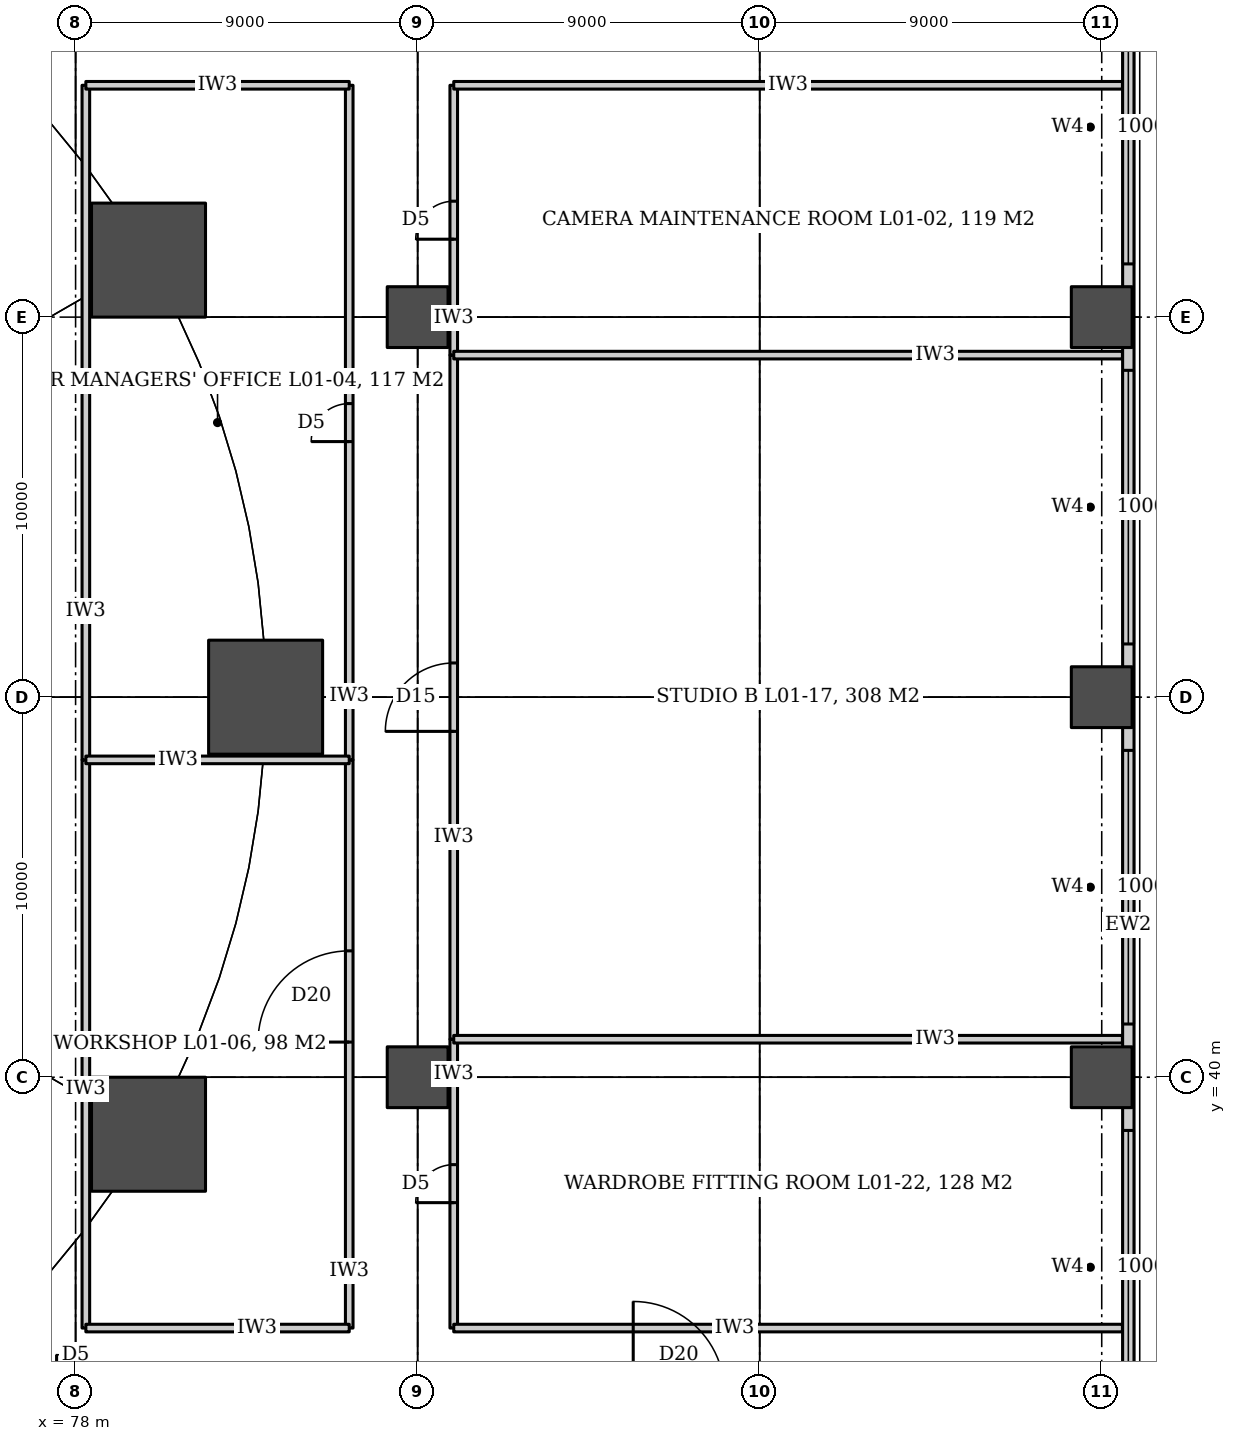
"""IFC4 building model, lengths in metres.
Left out: names, types, materials, properties, quantities, classifications, styles, units other than length and angle.
Written with IfcOpenShell. Run it as: python <this file> out.ifc"""

import sys

from ifc_helpers import new_model, si_unit, direction, frame, frame_2d, origin, origin_2d, place, context, subcontext, project, spatial, rectangle, circle, extrude, element, fill, save


model = new_model("IFC4")
c1 = context("Model", 3, precision=1e-05, world=origin(), true_north=direction((0.0, 1.0)))
c2 = subcontext(c1, "Body", "Model", "MODEL_VIEW")
j1 = project(units=[si_unit("LENGTHUNIT", "METRE"), si_unit("PLANEANGLEUNIT", "RADIAN")], contexts=[c1])
p1 = place(None, origin())
s1 = spatial("IfcSite", under=j1, at=p1, CompositionType="ELEMENT")
p2 = place(p1, origin())
s2 = spatial("IfcBuilding", under=s1, at=p2, CompositionType="ELEMENT")
p3 = place(p2, frame((0.0, 0.0, 6.0)))
s3 = spatial("IfcBuildingStorey", under=s2, at=p3, CompositionType="ELEMENT", Elevation=6.0)
for number, where, z_axis, x_axis in (
    (1, (87.0, 40.0, 0.0), (0.0, 0.0, 1.0), (1.0, 0.0, 0.0)),
    (2, (105.0, 40.0, 0.0), (0.0, 0.0, 1.0), (1.0, 0.0, 0.0)),
    (3, (105.0, 50.0, 0.0), (0.0, 0.0, 1.0), (1.0, 0.0, 0.0)),
    (4, (87.0, 60.0, 0.0), (0.0, 0.0, 1.0), (1.0, 0.0, 0.0)),
    (5, (105.0, 60.0, 0.0), (0.0, 0.0, 1.0), (1.0, 0.0, 0.0)),
):
    element("IfcColumn", number, at=place(p3, frame(where, z_axis=z_axis, x_axis=x_axis)), inside=s3, PredefinedType="COLUMN", context=c2, shape_type="SweptSolid", body=[
        extrude(rectangle(XDim=1.6, YDim=1.6, at=origin_2d()), origin(), (0.0, 0.0, 1.0), 9.0),
    ])
for number, where, z_axis, x_axis in (
    (6, (83.0, 50.0, 0.0), (0.0, 0.0, 1.0), (1.0, 0.0, 0.0)),
    (7, (79.919, 61.5, 0.0), (0.0, 0.0, 1.0), (1.0, 0.0, 0.0)),
    (8, (79.919, 38.5, 0.0), (0.0, 0.0, 1.0), (1.0, 0.0, 0.0)),
):
    element("IfcColumn", number, at=place(p3, frame(where, z_axis=z_axis, x_axis=x_axis)), inside=s3, PredefinedType="COLUMN", context=c2, shape_type="SweptSolid", body=[
        extrude(circle(Radius=1.5, at=origin_2d()), origin(), (0.0, 0.0, 1.0), 9.0),
    ])
p4 = place(p3, frame((78.27, 33.4, 0.0), z_axis=(0.0, 0.0, 1.0), x_axis=(0.0, 1.0, 0.0)))
e9 = element("IfcWall", 9, at=p4, inside=s3, PredefinedType="PARTITIONING", context=c2, shape_type="SweptSolid", body=[
    extrude(rectangle(XDim=14.95, YDim=0.2, at=frame_2d((7.475, 0.0))), origin(), (0.0, 0.0, 1.0), 6.08),
])
p5 = place(p3, frame((78.27, 48.35, 0.0), z_axis=(0.0, 0.0, 1.0), x_axis=(0.0, 1.0, 0.0)))
e10 = element("IfcWall", 10, at=p5, inside=s3, PredefinedType="PARTITIONING", context=c2, shape_type="SweptSolid", body=[
    extrude(rectangle(XDim=17.75, YDim=0.2, at=frame_2d((8.875, 0.0))), origin(), (0.0, 0.0, 1.0), 6.08),
])
p6 = place(p3, frame((85.2, 33.4, 0.0), z_axis=(0.0, 0.0, 1.0), x_axis=(0.0, 1.0, 0.0)))
e11 = element("IfcWall", 11, at=p6, inside=s3, PredefinedType="PARTITIONING", context=c2, shape_type="SweptSolid", body=[
    extrude(rectangle(XDim=14.95, YDim=0.2, at=frame_2d((7.475, 0.0))), origin(), (0.0, 0.0, 1.0), 6.68),
])
p7 = place(p6, frame((7.525, 0.0, 0.0)))
e12 = element("IfcOpeningElement", 12, at=p7, cuts=e11, PredefinedType="OPENING", context=c2, shape_type="SweptSolid", body=[
    extrude(rectangle(XDim=2.4, YDim=2.7, at=frame_2d((1.2, 1.35))), frame((0.0, 0.11, 0.0), z_axis=(0.0, -1.0, 0.0), x_axis=(1.0, 0.0, 0.0)), (0.0, 0.0, 1.0), 0.22),
])
p8 = place(p3, frame((85.2, 48.35, 0.0), z_axis=(0.0, 0.0, 1.0), x_axis=(0.0, 1.0, 0.0)))
e13 = element("IfcWall", 13, at=p8, inside=s3, PredefinedType="PARTITIONING", context=c2, shape_type="SweptSolid", body=[
    extrude(rectangle(XDim=17.75, YDim=0.2, at=frame_2d((8.875, 0.0))), origin(), (0.0, 0.0, 1.0), 6.18),
])
p9 = place(p8, frame((8.375, 0.0, 0.0)))
e14 = element("IfcOpeningElement", 14, at=p9, cuts=e13, PredefinedType="OPENING", context=c2, shape_type="SweptSolid", body=[
    extrude(rectangle(XDim=1.0, YDim=2.1, at=frame_2d((0.5, 1.05))), frame((0.0, 0.11, 0.0), z_axis=(0.0, -1.0, 0.0), x_axis=(1.0, 0.0, 0.0)), (0.0, 0.0, 1.0), 0.22),
])
p10 = place(p3, frame((87.95, 33.4, 0.0), z_axis=(0.0, 0.0, 1.0), x_axis=(0.0, 1.0, 0.0)))
e15 = element("IfcWall", 15, at=p10, inside=s3, PredefinedType="PARTITIONING", context=c2, shape_type="SweptSolid", body=[
    extrude(rectangle(XDim=7.6, YDim=0.2, at=frame_2d((3.8, 0.0))), origin(), (0.0, 0.0, 1.0), 6.18),
])
p11 = place(p10, frame((3.3, 0.0, 0.0)))
e16 = element("IfcOpeningElement", 16, at=p11, cuts=e15, PredefinedType="OPENING", context=c2, shape_type="SweptSolid", body=[
    extrude(rectangle(XDim=1.0, YDim=2.1, at=frame_2d((0.5, 1.05))), frame((0.0, 0.11, 0.0), z_axis=(0.0, -1.0, 0.0), x_axis=(1.0, 0.0, 0.0)), (0.0, 0.0, 1.0), 0.22),
])
p12 = place(p3, frame((87.95, 41.0, 0.0), z_axis=(0.0, 0.0, 1.0), x_axis=(0.0, 1.0, 0.0)))
e17 = element("IfcWall", 17, at=p12, inside=s3, PredefinedType="PARTITIONING", context=c2, shape_type="SweptSolid", body=[
    extrude(rectangle(XDim=18.0, YDim=0.2, at=frame_2d((9.0, 0.0))), origin(), (0.0, 0.0, 1.0), 6.18),
])
p13 = place(p12, frame((8.1, 0.0, 0.0)))
e18 = element("IfcOpeningElement", 18, at=p13, cuts=e17, PredefinedType="OPENING", context=c2, shape_type="SweptSolid", body=[
    extrude(rectangle(XDim=1.8, YDim=2.7, at=frame_2d((0.9, 1.35))), frame((0.0, 0.11, 0.0), z_axis=(0.0, -1.0, 0.0), x_axis=(1.0, 0.0, 0.0)), (0.0, 0.0, 1.0), 0.22),
])
p14 = place(p3, frame((87.95, 59.0, 0.0), z_axis=(0.0, 0.0, 1.0), x_axis=(0.0, 1.0, 0.0)))
e19 = element("IfcWall", 19, at=p14, inside=s3, PredefinedType="PARTITIONING", context=c2, shape_type="SweptSolid", body=[
    extrude(rectangle(XDim=7.1, YDim=0.2, at=frame_2d((3.55, 0.0))), origin(), (0.0, 0.0, 1.0), 6.18),
])
p15 = place(p14, frame((3.05, 0.0, 0.0)))
e20 = element("IfcOpeningElement", 20, at=p15, cuts=e19, PredefinedType="OPENING", context=c2, shape_type="SweptSolid", body=[
    extrude(rectangle(XDim=1.0, YDim=2.1, at=frame_2d((0.5, 1.05))), frame((0.0, 0.11, 0.0), z_axis=(0.0, -1.0, 0.0), x_axis=(1.0, 0.0, 0.0)), (0.0, 0.0, 1.0), 0.22),
])
p16 = place(p3, frame((78.27, 33.4, 0.0), z_axis=(0.0, 0.0, 1.0), x_axis=(1.0, 0.0, 0.0)))
e21 = element("IfcWall", 21, at=p16, inside=s3, PredefinedType="PARTITIONING", context=c2, shape_type="SweptSolid", body=[
    extrude(rectangle(XDim=6.93, YDim=0.2, at=frame_2d((3.465, 0.0))), origin(), (0.0, 0.0, 1.0), 6.68),
])
for number, where, z_axis, x_axis in (
    (22, (87.95, 33.4, 0.0), (0.0, 0.0, 1.0), (1.0, 0.0, 0.0)),
    (23, (87.95, 41.0, 0.0), (0.0, 0.0, 1.0), (1.0, 0.0, 0.0)),
):
    element("IfcWall", number, at=place(p3, frame(where, z_axis=z_axis, x_axis=x_axis)), inside=s3, PredefinedType="PARTITIONING", context=c2, shape_type="SweptSolid", body=[
        extrude(rectangle(XDim=17.595, YDim=0.2, at=frame_2d((8.797, 0.0))), origin(), (0.0, 0.0, 1.0), 6.68),
    ])
p17 = place(p3, frame((78.27, 48.35, 0.0), z_axis=(0.0, 0.0, 1.0), x_axis=(1.0, 0.0, 0.0)))
e24 = element("IfcWall", 24, at=p17, inside=s3, PredefinedType="PARTITIONING", context=c2, shape_type="SweptSolid", body=[
    extrude(rectangle(XDim=6.93, YDim=0.2, at=frame_2d((3.465, 0.0))), origin(), (0.0, 0.0, 1.0), 6.68),
])
p18 = place(p3, frame((87.95, 59.0, 0.0), z_axis=(0.0, 0.0, 1.0), x_axis=(1.0, 0.0, 0.0)))
e25 = element("IfcWall", 25, at=p18, inside=s3, PredefinedType="PARTITIONING", context=c2, shape_type="SweptSolid", body=[
    extrude(rectangle(XDim=17.595, YDim=0.2, at=frame_2d((8.797, 0.0))), origin(), (0.0, 0.0, 1.0), 6.68),
])
p19 = place(p3, frame((78.27, 66.1, 0.0), z_axis=(0.0, 0.0, 1.0), x_axis=(1.0, 0.0, 0.0)))
e26 = element("IfcWall", 26, at=p19, inside=s3, PredefinedType="PARTITIONING", context=c2, shape_type="SweptSolid", body=[
    extrude(rectangle(XDim=6.93, YDim=0.2, at=frame_2d((3.465, 0.0))), origin(), (0.0, 0.0, 1.0), 6.68),
])
p20 = place(p3, frame((87.95, 66.1, 0.0), z_axis=(0.0, 0.0, 1.0), x_axis=(1.0, 0.0, 0.0)))
e27 = element("IfcWall", 27, at=p20, inside=s3, PredefinedType="PARTITIONING", context=c2, shape_type="SweptSolid", body=[
    extrude(rectangle(XDim=17.595, YDim=0.2, at=frame_2d((8.797, 0.0))), origin(), (0.0, 0.0, 1.0), 6.68),
])
p21 = place(p3, frame((105.7, 30.0, 0.0), z_axis=(0.0, 0.0, 1.0), x_axis=(0.0, 1.0, 0.0)))
e28 = element("IfcWall", 28, at=p21, inside=s3, PredefinedType="SOLIDWALL", context=c2, shape_type="SweptSolid", body=[
    extrude(rectangle(XDim=40.0, YDim=0.3, at=frame_2d((20.0, 0.0))), origin(), (0.0, 0.0, 1.0), 8.7),
])
p22 = place(p21, frame((1.4, 0.0, 6.6)))
e29 = element("IfcOpeningElement", 29, at=p22, cuts=e28, PredefinedType="OPENING", context=c2, shape_type="SweptSolid", body=[
    extrude(rectangle(XDim=7.2, YDim=1.2, at=frame_2d((3.6, 0.6))), frame((0.0, 0.16, 0.0), z_axis=(0.0, -1.0, 0.0), x_axis=(1.0, 0.0, 0.0)), (0.0, 0.0, 1.0), 0.32),
])
p23 = place(p21, frame((11.4, 0.0, 6.6)))
e30 = element("IfcOpeningElement", 30, at=p23, cuts=e28, PredefinedType="OPENING", context=c2, shape_type="SweptSolid", body=[
    extrude(rectangle(XDim=7.2, YDim=1.2, at=frame_2d((3.6, 0.6))), frame((0.0, 0.16, 0.0), z_axis=(0.0, -1.0, 0.0), x_axis=(1.0, 0.0, 0.0)), (0.0, 0.0, 1.0), 0.32),
])
p24 = place(p21, frame((21.4, 0.0, 6.6)))
e31 = element("IfcOpeningElement", 31, at=p24, cuts=e28, PredefinedType="OPENING", context=c2, shape_type="SweptSolid", body=[
    extrude(rectangle(XDim=7.2, YDim=1.2, at=frame_2d((3.6, 0.6))), frame((0.0, 0.16, 0.0), z_axis=(0.0, -1.0, 0.0), x_axis=(1.0, 0.0, 0.0)), (0.0, 0.0, 1.0), 0.32),
])
p25 = place(p21, frame((31.4, 0.0, 6.6)))
e32 = element("IfcOpeningElement", 32, at=p25, cuts=e28, PredefinedType="OPENING", context=c2, shape_type="SweptSolid", body=[
    extrude(rectangle(XDim=7.2, YDim=1.2, at=frame_2d((3.6, 0.6))), frame((0.0, 0.16, 0.0), z_axis=(0.0, -1.0, 0.0), x_axis=(1.0, 0.0, 0.0)), (0.0, 0.0, 1.0), 0.32),
])
p26 = place(p13, origin())
e33 = element("IfcDoor", 33, at=p26, inside=s3, OperationType="DOUBLE_DOOR_DOUBLE_SWING", PredefinedType="DOOR", context=c2, shape_type="SweptSolid", body=[
    extrude(rectangle(XDim=1.8, YDim=2.7, at=frame_2d((0.9, 1.35))), frame((0.0, 0.025, 0.0), z_axis=(0.0, -1.0, 0.0), x_axis=(1.0, 0.0, 0.0)), (0.0, 0.0, 1.0), 0.05),
])
fill(e18, e33)
p27 = place(p7, origin())
e34 = element("IfcDoor", 34, at=p27, inside=s3, OperationType="DOUBLE_DOOR_DOUBLE_SWING", PredefinedType="DOOR", context=c2, shape_type="SweptSolid", body=[
    extrude(rectangle(XDim=2.4, YDim=2.7, at=frame_2d((1.2, 1.35))), frame((0.0, 0.025, 0.0), z_axis=(0.0, -1.0, 0.0), x_axis=(1.0, 0.0, 0.0)), (0.0, 0.0, 1.0), 0.05),
])
fill(e12, e34)
p28 = place(p9, origin())
e35 = element("IfcDoor", 35, at=p28, inside=s3, OperationType="SINGLE_SWING_LEFT", PredefinedType="DOOR", context=c2, shape_type="SweptSolid", body=[
    extrude(rectangle(XDim=1.0, YDim=2.1, at=frame_2d((0.5, 1.05))), frame((0.0, 0.025, 0.0), z_axis=(0.0, -1.0, 0.0), x_axis=(1.0, 0.0, 0.0)), (0.0, 0.0, 1.0), 0.05),
])
fill(e14, e35)
p29 = place(p11, origin())
e36 = element("IfcDoor", 36, at=p29, inside=s3, OperationType="SINGLE_SWING_LEFT", PredefinedType="DOOR", context=c2, shape_type="SweptSolid", body=[
    extrude(rectangle(XDim=1.0, YDim=2.1, at=frame_2d((0.5, 1.05))), frame((0.0, 0.025, 0.0), z_axis=(0.0, -1.0, 0.0), x_axis=(1.0, 0.0, 0.0)), (0.0, 0.0, 1.0), 0.05),
])
fill(e16, e36)
p30 = place(p15, origin())
e37 = element("IfcDoor", 37, at=p30, inside=s3, OperationType="SINGLE_SWING_LEFT", PredefinedType="DOOR", context=c2, shape_type="SweptSolid", body=[
    extrude(rectangle(XDim=1.0, YDim=2.1, at=frame_2d((0.5, 1.05))), frame((0.0, 0.025, 0.0), z_axis=(0.0, -1.0, 0.0), x_axis=(1.0, 0.0, 0.0)), (0.0, 0.0, 1.0), 0.05),
])
fill(e20, e37)
p31 = place(p22, origin())
e38 = element("IfcWindow", 38, at=p31, inside=s3, PartitioningType="SINGLE_PANEL", PredefinedType="WINDOW", context=c2, shape_type="SweptSolid", body=[
    extrude(rectangle(XDim=7.2, YDim=1.2, at=frame_2d((3.6, 0.6))), frame((0.0, 0.03, 0.0), z_axis=(0.0, -1.0, 0.0), x_axis=(1.0, 0.0, 0.0)), (0.0, 0.0, 1.0), 0.06),
])
fill(e29, e38)
p32 = place(p23, origin())
e39 = element("IfcWindow", 39, at=p32, inside=s3, PartitioningType="SINGLE_PANEL", PredefinedType="WINDOW", context=c2, shape_type="SweptSolid", body=[
    extrude(rectangle(XDim=7.2, YDim=1.2, at=frame_2d((3.6, 0.6))), frame((0.0, 0.03, 0.0), z_axis=(0.0, -1.0, 0.0), x_axis=(1.0, 0.0, 0.0)), (0.0, 0.0, 1.0), 0.06),
])
fill(e30, e39)
p33 = place(p24, origin())
e40 = element("IfcWindow", 40, at=p33, inside=s3, PartitioningType="SINGLE_PANEL", PredefinedType="WINDOW", context=c2, shape_type="SweptSolid", body=[
    extrude(rectangle(XDim=7.2, YDim=1.2, at=frame_2d((3.6, 0.6))), frame((0.0, 0.03, 0.0), z_axis=(0.0, -1.0, 0.0), x_axis=(1.0, 0.0, 0.0)), (0.0, 0.0, 1.0), 0.06),
])
fill(e31, e40)
p34 = place(p25, origin())
e41 = element("IfcWindow", 41, at=p34, inside=s3, PartitioningType="SINGLE_PANEL", PredefinedType="WINDOW", context=c2, shape_type="SweptSolid", body=[
    extrude(rectangle(XDim=7.2, YDim=1.2, at=frame_2d((3.6, 0.6))), frame((0.0, 0.03, 0.0), z_axis=(0.0, -1.0, 0.0), x_axis=(1.0, 0.0, 0.0)), (0.0, 0.0, 1.0), 0.06),
])
fill(e32, e41)
save(model, sys.argv[1])
